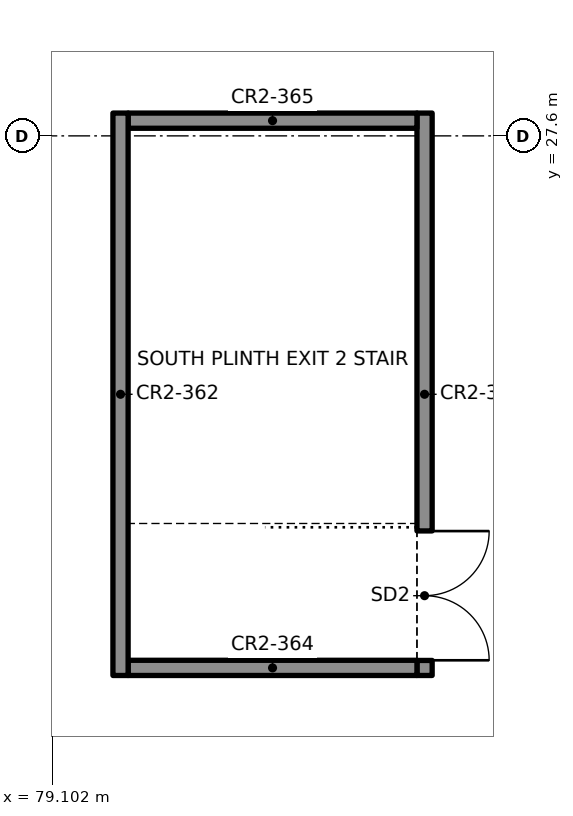
"""IFC4 building model, lengths in metres.
Left out: names, types, materials, properties, quantities, classifications, styles, units other than length and angle.
Written with IfcOpenShell. Run it as: python <this file> out.ifc"""

import sys

from ifc_helpers import new_model, si_unit, direction, frame, frame_2d, origin, place, context, subcontext, project, spatial, rectangle, extrude, element, fill, save


model = new_model("IFC4")
c1 = context("Model", 3, precision=1e-05, world=origin(), true_north=direction((0.0, 1.0)))
c2 = subcontext(c1, "Body", "Model", "MODEL_VIEW")
j1 = project(units=[si_unit("LENGTHUNIT", "METRE"), si_unit("PLANEANGLEUNIT", "RADIAN")], contexts=[c1])
p1 = place(None, origin())
s1 = spatial("IfcSite", under=j1, at=p1, CompositionType="ELEMENT")
p2 = place(p1, origin())
s2 = spatial("IfcBuilding", under=s1, at=p2, CompositionType="ELEMENT")
p3 = place(p2, frame((0.0, 0.0, 4.4)))
s3 = spatial("IfcBuildingStorey", under=s2, at=p3, CompositionType="ELEMENT", Elevation=4.4)
p4 = place(p3, frame((80.0, 20.5, 0.0), z_axis=(0.0, 0.0, 1.0), x_axis=(0.0, 1.0, 0.0)))
e1 = element("IfcWall", 1, at=p4, inside=s3, PredefinedType="SOLIDWALL", context=c2, shape_type="SweptSolid", body=[
    extrude(rectangle(XDim=7.4, YDim=0.2, at=frame_2d((3.7, 0.0))), origin(), (0.0, 0.0, 1.0), 3.0),
])
p5 = place(p3, frame((84.0, 20.5, 0.0), z_axis=(0.0, 0.0, 1.0), x_axis=(0.0, 1.0, 0.0)))
e2 = element("IfcWall", 2, at=p5, inside=s3, PredefinedType="SOLIDWALL", context=c2, shape_type="SweptSolid", body=[
    extrude(rectangle(XDim=7.4, YDim=0.2, at=frame_2d((3.7, 0.0))), origin(), (0.0, 0.0, 1.0), 3.0),
])
p6 = place(p5, frame((0.2, 0.0, 0.0)))
e3 = element("IfcOpeningElement", 3, at=p6, cuts=e2, PredefinedType="OPENING", context=c2, shape_type="SweptSolid", body=[
    extrude(rectangle(XDim=1.7, YDim=2.1, at=frame_2d((0.85, 1.05))), frame((0.0, 0.11, 0.0), z_axis=(0.0, -1.0, 0.0), x_axis=(1.0, 0.0, 0.0)), (0.0, 0.0, 1.0), 0.22),
])
for number, where, z_axis, x_axis in (
    (4, (80.1, 20.6, 0.0), (0.0, 0.0, 1.0), (1.0, 0.0, 0.0)),
    (5, (80.1, 27.8, 0.0), (0.0, 0.0, 1.0), (1.0, 0.0, 0.0)),
):
    element("IfcWall", number, at=place(p3, frame(where, z_axis=z_axis, x_axis=x_axis)), inside=s3, PredefinedType="SOLIDWALL", context=c2, shape_type="SweptSolid", body=[
        extrude(rectangle(XDim=3.8, YDim=0.2, at=frame_2d((1.9, 0.0))), origin(), (0.0, 0.0, 1.0), 3.0),
    ])
p7 = place(p6, origin())
e6 = element("IfcDoor", 6, at=p7, inside=s3, OperationType="DOUBLE_DOOR_SINGLE_SWING", PredefinedType="DOOR", context=c2, shape_type="SweptSolid", body=[
    extrude(rectangle(XDim=1.7, YDim=2.1, at=frame_2d((0.85, 1.05))), frame((0.0, 0.025, 0.0), z_axis=(0.0, -1.0, 0.0), x_axis=(1.0, 0.0, 0.0)), (0.0, 0.0, 1.0), 0.05),
])
fill(e3, e6)
save(model, sys.argv[1])
